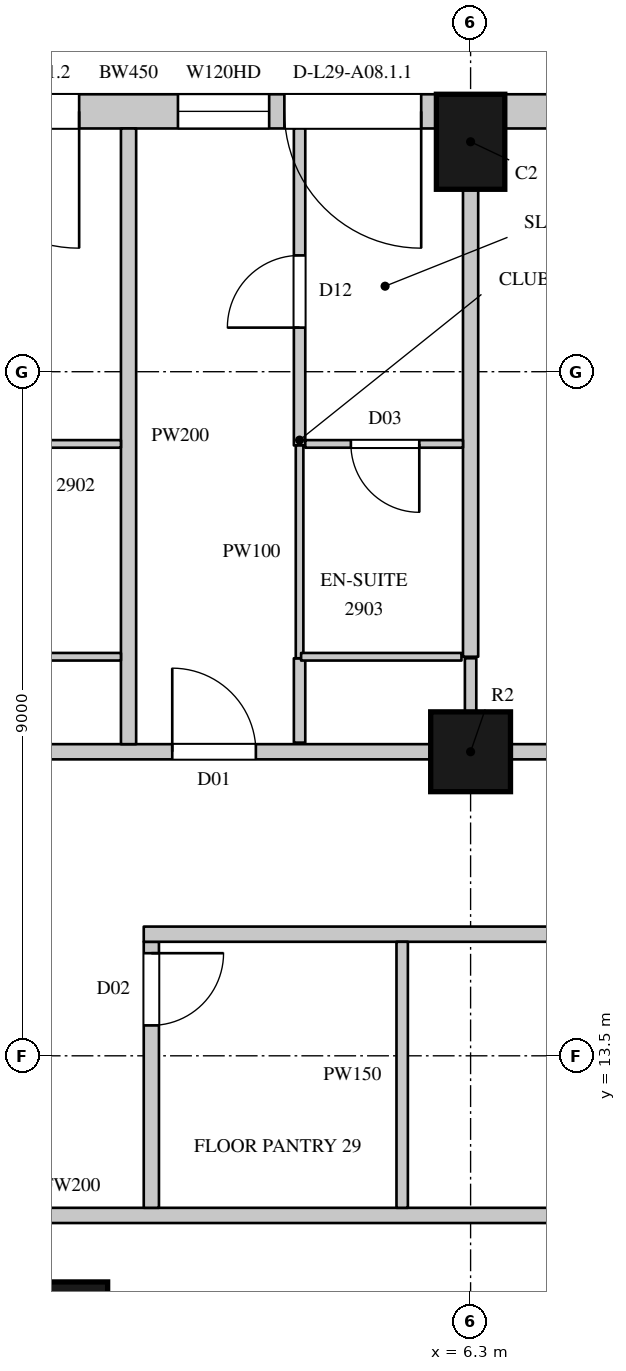
"""IFC4 building model, lengths in metres.
Left out: names, types, materials, properties, quantities, classifications, styles, units other than length and angle.
Written with IfcOpenShell. Run it as: python <this file> out.ifc"""

import sys

from ifc_helpers import new_model, si_unit, direction, frame, frame_2d, origin, origin_2d, place, context, subcontext, project, spatial, rectangle, circle, extrude, element, fill, save


model = new_model("IFC4")
c1 = context("Model", 3, precision=1e-05, world=origin(), true_north=direction((0.0, 1.0)))
c2 = subcontext(c1, "Body", "Model", "MODEL_VIEW")
j1 = project(units=[si_unit("LENGTHUNIT", "METRE"), si_unit("PLANEANGLEUNIT", "RADIAN")], contexts=[c1])
p1 = place(None, origin())
s1 = spatial("IfcSite", under=j1, at=p1, CompositionType="ELEMENT")
p2 = place(p1, origin())
s2 = spatial("IfcBuilding", under=s1, at=p2, CompositionType="ELEMENT")
p3 = place(p2, frame((0.0, 0.0, 134.7)))
s3 = spatial("IfcBuildingStorey", under=s2, at=p3, CompositionType="ELEMENT", Elevation=134.7)
p4 = place(p3, frame((6.3, 25.525, 0.0), z_axis=(0.0, 0.0, 1.0), x_axis=(-1.0, 0.0, 0.0)))
e1 = element("IfcColumn", 1, at=p4, inside=s3, PredefinedType="COLUMN", context=c2, shape_type="SweptSolid", body=[
    extrude(rectangle(XDim=0.9, YDim=1.25, at=origin_2d()), origin(), (0.0, 0.0, 1.0), 3.6),
])
for number, where, z_axis, x_axis in (
    (2, (6.3, 17.5, 0.0), (0.0, 0.0, 1.0), (1.0, 0.0, 0.0)),
    (3, (1.0, 10.0, 0.0), (0.0, 0.0, 1.0), (1.0, 0.0, 0.0)),
):
    element("IfcColumn", number, at=place(p3, frame(where, z_axis=z_axis, x_axis=x_axis)), inside=s3, PredefinedType="COLUMN", context=c2, shape_type="SweptSolid", body=[
        extrude(circle(Radius=0.525, at=origin_2d()), origin(), (0.0, 0.0, 1.0), 3.6),
    ])
p5 = place(p3, frame((11.989, 25.925, 0.0), z_axis=(0.0, 0.0, 1.0), x_axis=(-1.0, 0.0, 0.0)))
e4 = element("IfcWall", 4, at=p5, inside=s3, PredefinedType="SOLIDWALL", context=c2, shape_type="SweptSolid", body=[
    extrude(rectangle(XDim=5.239, YDim=0.45, at=frame_2d((2.619, 0.0))), origin(), (0.0, 0.0, 1.0), 3.3),
])
p6 = place(p5, frame((1.77, 0.0, 1.05)))
e5 = element("IfcOpeningElement", 5, at=p6, cuts=e4, PredefinedType="OPENING", context=c2, shape_type="SweptSolid", body=[
    extrude(rectangle(XDim=2.1, YDim=2.0, at=frame_2d((1.05, 1.0))), frame((0.0, 0.235, 0.0), z_axis=(0.0, -1.0, 0.0), x_axis=(1.0, 0.0, 0.0)), (0.0, 0.0, 1.0), 0.47),
])
p7 = place(p3, frame((5.85, 25.925, 0.0), z_axis=(0.0, 0.0, 1.0), x_axis=(-1.0, 0.0, 0.0)))
e6 = element("IfcWall", 6, at=p7, inside=s3, PredefinedType="SOLIDWALL", context=c2, shape_type="SweptSolid", body=[
    extrude(rectangle(XDim=8.1, YDim=0.45, at=frame_2d((4.05, 0.0))), origin(), (0.0, 0.0, 1.0), 3.3),
])
p8 = place(p7, frame((0.2, 0.0, 0.0)))
e7 = element("IfcOpeningElement", 7, at=p8, cuts=e6, PredefinedType="OPENING", context=c2, shape_type="SweptSolid", body=[
    extrude(rectangle(XDim=1.8, YDim=2.4, at=frame_2d((0.9, 1.2))), frame((0.0, 0.235, 0.0), z_axis=(0.0, -1.0, 0.0), x_axis=(1.0, 0.0, 0.0)), (0.0, 0.0, 1.0), 0.47),
])
p9 = place(p7, frame((2.2, 0.0, 1.05)))
e8 = element("IfcOpeningElement", 8, at=p9, cuts=e6, PredefinedType="OPENING", context=c2, shape_type="SweptSolid", body=[
    extrude(rectangle(XDim=1.2, YDim=2.0, at=frame_2d((0.6, 1.0))), frame((0.0, 0.235, 0.0), z_axis=(0.0, -1.0, 0.0), x_axis=(1.0, 0.0, 0.0)), (0.0, 0.0, 1.0), 0.47),
])
p10 = place(p7, frame((4.7, 0.0, 0.0)))
e9 = element("IfcOpeningElement", 9, at=p10, cuts=e6, PredefinedType="OPENING", context=c2, shape_type="SweptSolid", body=[
    extrude(rectangle(XDim=1.8, YDim=2.4, at=frame_2d((0.9, 1.2))), frame((0.0, 0.235, 0.0), z_axis=(0.0, -1.0, 0.0), x_axis=(1.0, 0.0, 0.0)), (0.0, 0.0, 1.0), 0.47),
])
p11 = place(p7, frame((6.7, 0.0, 1.05)))
e10 = element("IfcOpeningElement", 10, at=p11, cuts=e6, PredefinedType="OPENING", context=c2, shape_type="SweptSolid", body=[
    extrude(rectangle(XDim=1.2, YDim=2.0, at=frame_2d((0.6, 1.0))), frame((0.0, 0.235, 0.0), z_axis=(0.0, -1.0, 0.0), x_axis=(1.0, 0.0, 0.0)), (0.0, 0.0, 1.0), 0.47),
])
p12 = place(p3, frame((-2.175, 17.5, 0.0), z_axis=(0.0, 0.0, 1.0), x_axis=(1.0, 0.0, 0.0)))
e11 = element("IfcWall", 11, at=p12, inside=s3, PredefinedType="PARTITIONING", context=c2, shape_type="SweptSolid", body=[
    extrude(rectangle(XDim=7.95, YDim=0.2, at=frame_2d((3.975, 0.0))), origin(), (0.0, 0.0, 1.0), 2.75),
])
p13 = place(p12, frame((4.55, 0.0, 0.0)))
e12 = element("IfcOpeningElement", 12, at=p13, cuts=e11, PredefinedType="OPENING", context=c2, shape_type="SweptSolid", body=[
    extrude(rectangle(XDim=1.1, YDim=2.4, at=frame_2d((0.55, 1.2))), frame((0.0, 0.11, 0.0), z_axis=(0.0, -1.0, 0.0), x_axis=(1.0, 0.0, 0.0)), (0.0, 0.0, 1.0), 0.22),
])
p14 = place(p3, frame((6.825, 17.5, 0.0), z_axis=(0.0, 0.0, 1.0), x_axis=(1.0, 0.0, 0.0)))
e13 = element("IfcWall", 13, at=p14, inside=s3, PredefinedType="PARTITIONING", context=c2, shape_type="SweptSolid", body=[
    extrude(rectangle(XDim=7.95, YDim=0.2, at=frame_2d((3.975, 0.0))), origin(), (0.0, 0.0, 1.0), 2.75),
])
p15 = place(p14, frame((1.55, 0.0, 0.0)))
e14 = element("IfcOpeningElement", 14, at=p15, cuts=e13, PredefinedType="OPENING", context=c2, shape_type="SweptSolid", body=[
    extrude(rectangle(XDim=1.1, YDim=2.4, at=frame_2d((0.55, 1.2))), frame((0.0, 0.11, 0.0), z_axis=(0.0, -1.0, 0.0), x_axis=(1.0, 0.0, 0.0)), (0.0, 0.0, 1.0), 0.22),
])
p16 = place(p3, frame((-8.3, 11.4, 0.0), z_axis=(0.0, 0.0, 1.0), x_axis=(1.0, 0.0, 0.0)))
e15 = element("IfcWall", 15, at=p16, inside=s3, PredefinedType="PARTITIONING", context=c2, shape_type="SweptSolid", body=[
    extrude(rectangle(XDim=18.7, YDim=0.2, at=frame_2d((9.35, 0.0))), origin(), (0.0, 0.0, 1.0), 3.3),
])
p17 = place(p16, frame((6.9, 0.0, 0.0)))
e16 = element("IfcOpeningElement", 16, at=p17, cuts=e15, PredefinedType="OPENING", context=c2, shape_type="SweptSolid", body=[
    extrude(rectangle(XDim=1.5, YDim=2.2, at=frame_2d((0.75, 1.1))), frame((0.0, 0.11, 0.0), z_axis=(0.0, -1.0, 0.0), x_axis=(1.0, 0.0, 0.0)), (0.0, 0.0, 1.0), 0.22),
])
p18 = place(p3, frame((2.1, 11.5, 0.0), z_axis=(0.0, 0.0, 1.0), x_axis=(0.0, 1.0, 0.0)))
e17 = element("IfcWall", 17, at=p18, inside=s3, PredefinedType="PARTITIONING", context=c2, shape_type="SweptSolid", body=[
    extrude(rectangle(XDim=3.5, YDim=0.2, at=frame_2d((1.75, 0.0))), origin(), (0.0, 0.0, 1.0), 3.3),
])
p19 = place(p18, frame((2.4, 0.0, 0.0)))
e18 = element("IfcOpeningElement", 18, at=p19, cuts=e17, PredefinedType="OPENING", context=c2, shape_type="SweptSolid", body=[
    extrude(rectangle(XDim=0.95, YDim=2.2, at=frame_2d((0.475, 1.1))), frame((0.0, 0.11, 0.0), z_axis=(0.0, -1.0, 0.0), x_axis=(1.0, 0.0, 0.0)), (0.0, 0.0, 1.0), 0.22),
])
p20 = place(p3, frame((2.0, 15.1, 0.0), z_axis=(0.0, 0.0, 1.0), x_axis=(1.0, 0.0, 0.0)))
e19 = element("IfcWall", 19, at=p20, inside=s3, PredefinedType="PARTITIONING", context=c2, shape_type="SweptSolid", body=[
    extrude(rectangle(XDim=11.8, YDim=0.2, at=frame_2d((5.9, 0.0))), origin(), (0.0, 0.0, 1.0), 3.3),
])
p21 = place(p20, frame((7.1, 0.0, 0.0)))
e20 = element("IfcOpeningElement", 20, at=p21, cuts=e19, PredefinedType="OPENING", context=c2, shape_type="SweptSolid", body=[
    extrude(rectangle(XDim=0.9, YDim=2.2, at=frame_2d((0.45, 1.1))), frame((0.0, 0.11, 0.0), z_axis=(0.0, -1.0, 0.0), x_axis=(1.0, 0.0, 0.0)), (0.0, 0.0, 1.0), 0.22),
])
p22 = place(p3, frame((4.05, 17.62, 0.0), z_axis=(0.0, 0.0, 1.0), x_axis=(0.0, 1.0, 0.0)))
e21 = element("IfcWall", 21, at=p22, inside=s3, PredefinedType="PARTITIONING", context=c2, shape_type="SweptSolid", body=[
    extrude(rectangle(XDim=1.11, YDim=0.15, at=frame_2d((0.555, 0.0))), origin(), (0.0, 0.0, 1.0), 3.3),
])
p23 = place(p3, frame((4.05, 21.53, 0.0), z_axis=(0.0, 0.0, 1.0), x_axis=(0.0, 1.0, 0.0)))
e22 = element("IfcWall", 22, at=p23, inside=s3, PredefinedType="PARTITIONING", context=c2, shape_type="SweptSolid", body=[
    extrude(rectangle(XDim=4.17, YDim=0.15, at=frame_2d((2.085, 0.0))), origin(), (0.0, 0.0, 1.0), 3.3),
])
p24 = place(p23, frame((1.55, 0.0, 0.0)))
e23 = element("IfcOpeningElement", 23, at=p24, cuts=e22, PredefinedType="OPENING", context=c2, shape_type="SweptSolid", body=[
    extrude(rectangle(XDim=0.95, YDim=2.2, at=frame_2d((0.475, 1.1))), frame((0.0, 0.085, 0.0), z_axis=(0.0, -1.0, 0.0), x_axis=(1.0, 0.0, 0.0)), (0.0, 0.0, 1.0), 0.17),
])
p25 = place(p3, frame((5.4, 11.5, 0.0), z_axis=(0.0, 0.0, 1.0), x_axis=(0.0, 1.0, 0.0)))
e24 = element("IfcWall", 24, at=p25, inside=s3, PredefinedType="PARTITIONING", context=c2, shape_type="SweptSolid", body=[
    extrude(rectangle(XDim=3.5, YDim=0.15, at=frame_2d((1.75, 0.0))), origin(), (0.0, 0.0, 1.0), 3.3),
])
p26 = place(p3, frame((6.3, 18.025, 0.0), z_axis=(0.0, 0.0, 1.0), x_axis=(0.0, 1.0, 0.0)))
e25 = element("IfcWall", 25, at=p26, inside=s3, PredefinedType="PARTITIONING", context=c2, shape_type="SweptSolid", body=[
    extrude(rectangle(XDim=0.705, YDim=0.15, at=frame_2d((0.353, 0.0))), origin(), (0.0, 0.0, 1.0), 2.75),
])
p27 = place(p3, frame((1.8, 17.6, 0.0), z_axis=(0.0, 0.0, 1.0), x_axis=(0.0, 1.0, 0.0)))
e26 = element("IfcWall", 26, at=p27, inside=s3, PredefinedType="PARTITIONING", context=c2, shape_type="SweptSolid", body=[
    extrude(rectangle(XDim=8.1, YDim=0.2, at=frame_2d((4.05, 0.0))), origin(), (0.0, 0.0, 1.0), 2.65),
])
p28 = place(p3, frame((6.3, 18.75, 0.0), z_axis=(0.0, 0.0, 1.0), x_axis=(0.0, 1.0, 0.0)))
e27 = element("IfcWall", 27, at=p28, inside=s3, PredefinedType="PARTITIONING", context=c2, shape_type="SweptSolid", body=[
    extrude(rectangle(XDim=6.15, YDim=0.2, at=frame_2d((3.075, 0.0))), origin(), (0.0, 0.0, 1.0), 2.75),
])
for number, where, z_axis, x_axis in (
    (28, (-0.846, 18.75, 0.0), (0.0, 0.0, 1.0), (1.0, 0.0, 0.0)),
    (29, (-0.846, 21.55, 0.0), (0.0, 0.0, 1.0), (1.0, 0.0, 0.0)),
):
    element("IfcWall", number, at=place(p3, frame(where, z_axis=z_axis, x_axis=x_axis)), inside=s3, PredefinedType="PARTITIONING", context=c2, shape_type="SweptSolid", body=[
        extrude(rectangle(XDim=2.546, YDim=0.1, at=frame_2d((1.273, 0.0))), origin(), (0.0, 0.0, 1.0), 3.3),
    ])
p29 = place(p3, frame((4.05, 18.73, 0.0), z_axis=(0.0, 0.0, 1.0), x_axis=(0.0, 1.0, 0.0)))
e30 = element("IfcWall", 30, at=p29, inside=s3, PredefinedType="PARTITIONING", context=c2, shape_type="SweptSolid", body=[
    extrude(rectangle(XDim=2.8, YDim=0.1, at=frame_2d((1.4, 0.0))), origin(), (0.0, 0.0, 1.0), 3.3),
])
p30 = place(p3, frame((4.125, 21.55, 0.0), z_axis=(0.0, 0.0, 1.0), x_axis=(1.0, 0.0, 0.0)))
e31 = element("IfcWall", 31, at=p30, inside=s3, PredefinedType="PARTITIONING", context=c2, shape_type="SweptSolid", body=[
    extrude(rectangle(XDim=2.075, YDim=0.1, at=frame_2d((1.038, 0.0))), origin(), (0.0, 0.0, 1.0), 3.3),
])
p31 = place(p30, frame((0.6, 0.0, 0.0)))
e32 = element("IfcOpeningElement", 32, at=p31, cuts=e31, PredefinedType="OPENING", context=c2, shape_type="SweptSolid", body=[
    extrude(rectangle(XDim=0.9, YDim=2.2, at=frame_2d((0.45, 1.1))), frame((0.0, 0.06, 0.0), z_axis=(0.0, -1.0, 0.0), x_axis=(1.0, 0.0, 0.0)), (0.0, 0.0, 1.0), 0.12),
])
p32 = place(p3, frame((4.07, 18.75, 0.0), z_axis=(0.0, 0.0, 1.0), x_axis=(1.0, 0.0, 0.0)))
e33 = element("IfcWall", 33, at=p32, inside=s3, PredefinedType="PARTITIONING", context=c2, shape_type="SweptSolid", body=[
    extrude(rectangle(XDim=2.11, YDim=0.1, at=frame_2d((1.055, 0.0))), origin(), (0.0, 0.0, 1.0), 3.3),
])
p33 = place(p8, origin())
e34 = element("IfcDoor", 34, at=p33, inside=s3, OperationType="SLIDING_TO_LEFT", PredefinedType="DOOR", context=c2, shape_type="SweptSolid", body=[
    extrude(rectangle(XDim=1.8, YDim=2.4, at=frame_2d((0.9, 1.2))), frame((0.0, 0.13, 0.0), z_axis=(0.0, -1.0, 0.0), x_axis=(1.0, 0.0, 0.0)), (0.0, 0.0, 1.0), 0.05),
])
fill(e7, e34)
p34 = place(p9, origin())
e35 = element("IfcWindow", 35, at=p34, inside=s3, PartitioningType="SINGLE_PANEL", PredefinedType="WINDOW", context=c2, shape_type="SweptSolid", body=[
    extrude(rectangle(XDim=1.2, YDim=2.0, at=frame_2d((0.6, 1.0))), frame((0.0, 0.135, 0.0), z_axis=(0.0, -1.0, 0.0), x_axis=(1.0, 0.0, 0.0)), (0.0, 0.0, 1.0), 0.06),
])
fill(e8, e35)
p35 = place(p10, origin())
e36 = element("IfcDoor", 36, at=p35, inside=s3, OperationType="SLIDING_TO_LEFT", PredefinedType="DOOR", context=c2, shape_type="SweptSolid", body=[
    extrude(rectangle(XDim=1.8, YDim=2.4, at=frame_2d((0.9, 1.2))), frame((0.0, 0.13, 0.0), z_axis=(0.0, -1.0, 0.0), x_axis=(1.0, 0.0, 0.0)), (0.0, 0.0, 1.0), 0.05),
])
fill(e9, e36)
p36 = place(p19, origin())
e37 = element("IfcDoor", 37, at=p36, inside=s3, OperationType="SINGLE_SWING_LEFT", PredefinedType="DOOR", context=c2, shape_type="SweptSolid", body=[
    extrude(rectangle(XDim=0.95, YDim=2.2, at=frame_2d((0.475, 1.1))), frame((0.0, 0.025, 0.0), z_axis=(0.0, -1.0, 0.0), x_axis=(1.0, 0.0, 0.0)), (0.0, 0.0, 1.0), 0.05),
])
fill(e18, e37)
p37 = place(p13, origin())
e38 = element("IfcDoor", 38, at=p37, inside=s3, OperationType="SINGLE_SWING_LEFT", PredefinedType="DOOR", context=c2, shape_type="SweptSolid", body=[
    extrude(rectangle(XDim=1.1, YDim=2.4, at=frame_2d((0.55, 1.2))), frame((0.0, 0.025, 0.0), z_axis=(0.0, -1.0, 0.0), x_axis=(1.0, 0.0, 0.0)), (0.0, 0.0, 1.0), 0.05),
])
fill(e12, e38)
p38 = place(p24, origin())
e39 = element("IfcDoor", 39, at=p38, inside=s3, OperationType="SINGLE_SWING_LEFT", PredefinedType="DOOR", context=c2, shape_type="SweptSolid", body=[
    extrude(rectangle(XDim=0.95, YDim=2.2, at=frame_2d((0.475, 1.1))), frame((0.0, 0.025, 0.0), z_axis=(0.0, -1.0, 0.0), x_axis=(1.0, 0.0, 0.0)), (0.0, 0.0, 1.0), 0.05),
])
fill(e23, e39)
p39 = place(p31, origin())
e40 = element("IfcDoor", 40, at=p39, inside=s3, OperationType="SINGLE_SWING_LEFT", PredefinedType="DOOR", context=c2, shape_type="SweptSolid", body=[
    extrude(rectangle(XDim=0.9, YDim=2.2, at=frame_2d((0.45, 1.1))), frame((0.0, 0.025, 0.0), z_axis=(0.0, -1.0, 0.0), x_axis=(1.0, 0.0, 0.0)), (0.0, 0.0, 1.0), 0.05),
])
fill(e32, e40)
save(model, sys.argv[1])
